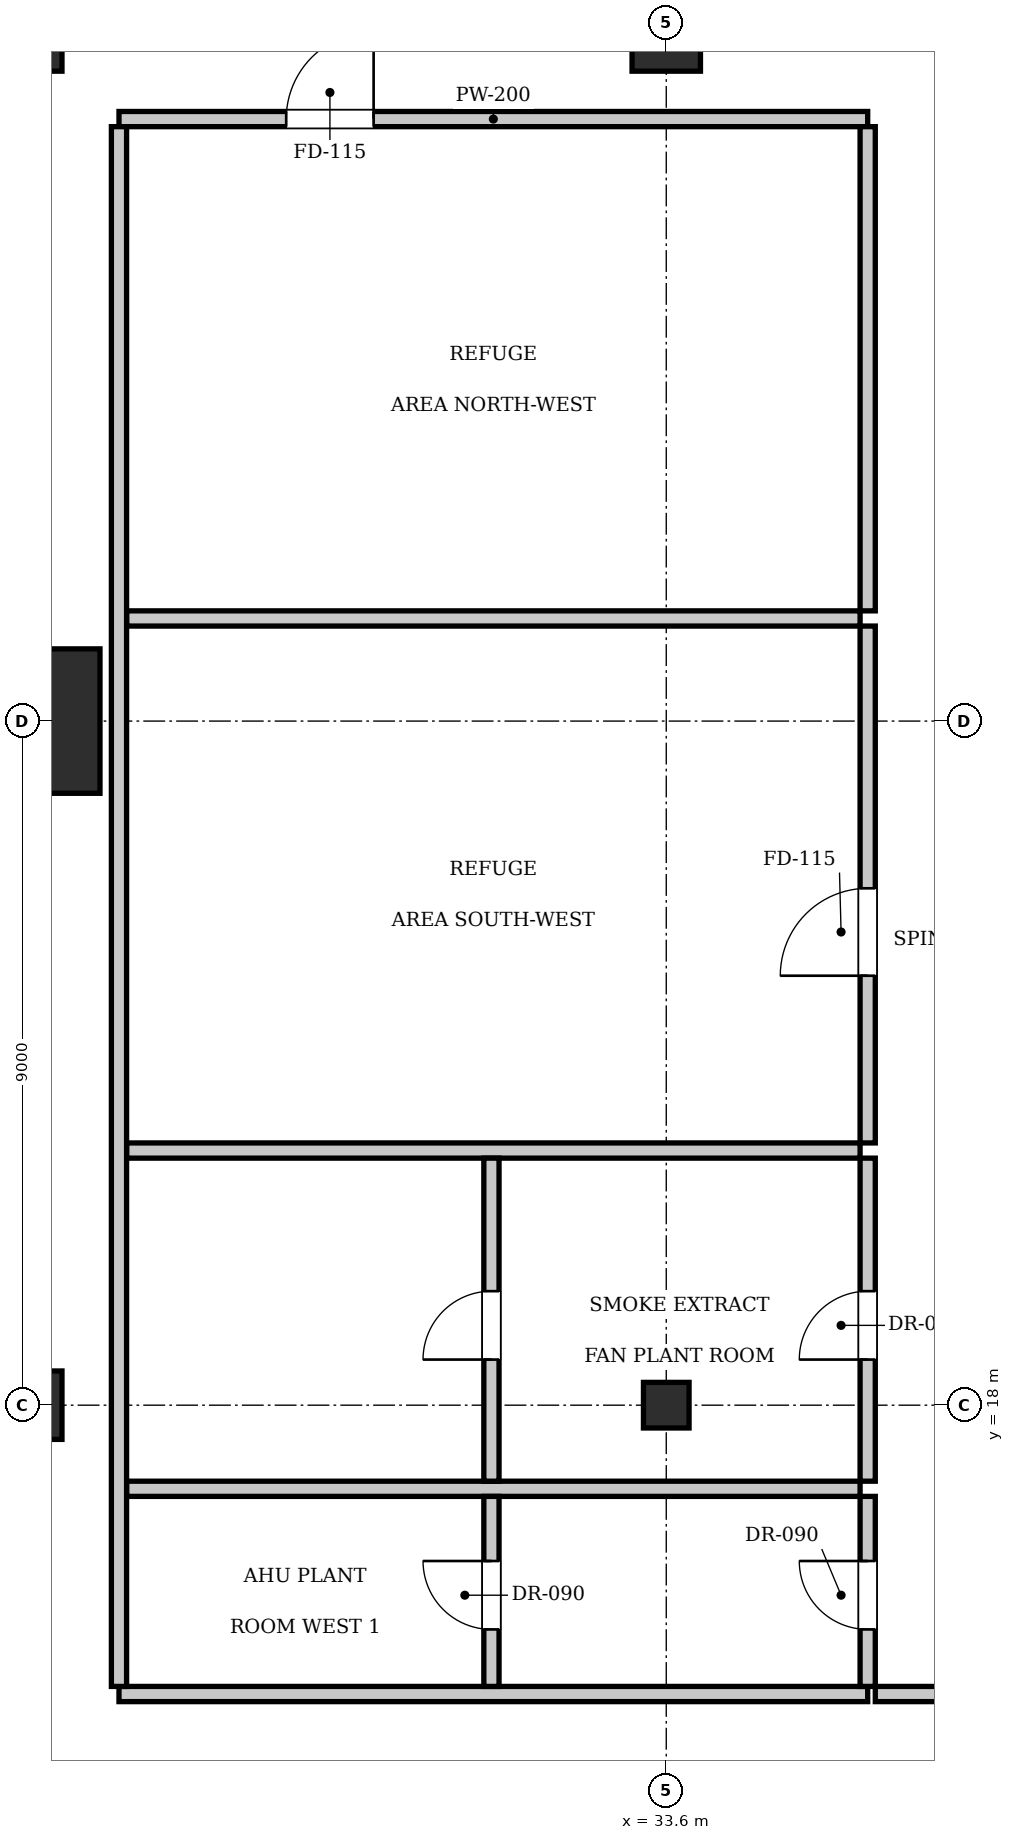
"""IFC4 building model, lengths in metres.
Left out: names, types, materials, properties, quantities, classifications, styles, units other than length and angle.
Written with IfcOpenShell. Run it as: python <this file> out.ifc"""

import sys

from ifc_helpers import new_model, si_unit, direction, frame, frame_2d, origin, origin_2d, place, context, subcontext, project, spatial, rectangle, i_section, extrude, element, fill, save


model = new_model("IFC4")
c1 = context("Model", 3, precision=1e-05, world=origin(), true_north=direction((0.0, 1.0)))
c2 = subcontext(c1, "Body", "Model", "MODEL_VIEW")
j1 = project(units=[si_unit("LENGTHUNIT", "METRE"), si_unit("PLANEANGLEUNIT", "RADIAN")], contexts=[c1])
p1 = place(None, origin())
s1 = spatial("IfcSite", under=j1, at=p1, CompositionType="ELEMENT")
p2 = place(p1, origin())
s2 = spatial("IfcBuilding", under=s1, at=p2, CompositionType="ELEMENT")
p3 = place(p2, frame((0.0, 0.0, 227.5)))
s3 = spatial("IfcBuildingStorey", under=s2, at=p3, CompositionType="ELEMENT", Elevation=227.5)
p4 = place(p3, frame((25.2, 27.0, 0.0), z_axis=(0.0, 0.0, 1.0), x_axis=(1.0, 0.0, 0.0)))
e1 = element("IfcColumn", 1, at=p4, inside=s3, PredefinedType="COLUMN", context=c2, shape_type="SweptSolid", body=[
    extrude(rectangle(XDim=1.9, YDim=1.9, at=origin_2d()), origin(), (0.0, 0.0, 1.0), 7.0),
])
for number, where, z_axis, x_axis in (
    (2, (25.2, 36.0, 0.0), (0.0, 0.0, 1.0), (1.0, 0.0, 0.0)),
    (3, (33.6, 36.0, 0.0), (0.0, 0.0, 1.0), (1.0, 0.0, 0.0)),
    (4, (25.2, 18.0, 0.0), (0.0, 0.0, 1.0), (1.0, 0.0, 0.0)),
):
    element("IfcColumn", number, at=place(p3, frame(where, z_axis=z_axis, x_axis=x_axis)), inside=s3, PredefinedType="COLUMN", context=c2, shape_type="SweptSolid", body=[
        extrude(rectangle(XDim=0.9, YDim=0.9, at=origin_2d()), origin(), (0.0, 0.0, 1.0), 7.0),
    ])
p5 = place(p3, frame((33.6, 18.0, 0.0), z_axis=(0.0, 0.0, 1.0), x_axis=(1.0, 0.0, 0.0)))
e5 = element("IfcColumn", 5, at=p5, inside=s3, PredefinedType="COLUMN", context=c2, shape_type="SweptSolid", body=[
    extrude(i_section(OverallWidth=0.6, OverallDepth=0.6, WebThickness=0.025, FlangeThickness=0.038, at=origin_2d()), origin(), (0.0, 0.0, 1.0), 7.0),
])
p6 = place(p3, frame((26.4, 34.92, 0.0), z_axis=(0.0, 0.0, 1.0), x_axis=(1.0, 0.0, 0.0)))
e6 = element("IfcWall", 6, at=p6, inside=s3, PredefinedType="PARTITIONING", context=c2, shape_type="SweptSolid", body=[
    extrude(rectangle(XDim=9.85, YDim=0.2, at=frame_2d((4.925, 0.0))), origin(), (0.0, 0.0, 1.0), 6.76),
])
p7 = place(p6, frame((2.2, 0.0, 0.0)))
e7 = element("IfcOpeningElement", 7, at=p7, cuts=e6, PredefinedType="OPENING", context=c2, shape_type="SweptSolid", body=[
    extrude(rectangle(XDim=1.15, YDim=2.15, at=frame_2d((0.575, 1.075))), frame((0.0, 0.11, 0.0), z_axis=(0.0, -1.0, 0.0), x_axis=(1.0, 0.0, 0.0)), (0.0, 0.0, 1.0), 0.22),
])
for number, where, z_axis, x_axis in (
    (8, (26.5, 28.35, 0.0), (0.0, 0.0, 1.0), (1.0, 0.0, 0.0)),
    (9, (26.5, 21.35, 0.0), (0.0, 0.0, 1.0), (1.0, 0.0, 0.0)),
    (10, (26.5, 16.9, 0.0), (0.0, 0.0, 1.0), (1.0, 0.0, 0.0)),
):
    element("IfcWall", number, at=place(p3, frame(where, z_axis=z_axis, x_axis=x_axis)), inside=s3, PredefinedType="PARTITIONING", context=c2, shape_type="SweptSolid", body=[
        extrude(rectangle(XDim=9.65, YDim=0.2, at=frame_2d((4.825, 0.0))), origin(), (0.0, 0.0, 1.0), 6.76),
    ])
p8 = place(p3, frame((26.4, 14.2, 0.0), z_axis=(0.0, 0.0, 1.0), x_axis=(1.0, 0.0, 0.0)))
e11 = element("IfcWall", 11, at=p8, inside=s3, PredefinedType="PARTITIONING", context=c2, shape_type="SweptSolid", body=[
    extrude(rectangle(XDim=9.85, YDim=0.2, at=frame_2d((4.925, 0.0))), origin(), (0.0, 0.0, 1.0), 6.76),
])
p9 = place(p3, frame((26.4, 14.3, 0.0), z_axis=(0.0, 0.0, 1.0), x_axis=(0.0, 1.0, 0.0)))
e12 = element("IfcWall", 12, at=p9, inside=s3, PredefinedType="PARTITIONING", context=c2, shape_type="SweptSolid", body=[
    extrude(rectangle(XDim=20.52, YDim=0.2, at=frame_2d((10.26, 0.0))), origin(), (0.0, 0.0, 1.0), 6.76),
])
p10 = place(p3, frame((36.25, 28.45, 0.0), z_axis=(0.0, 0.0, 1.0), x_axis=(0.0, 1.0, 0.0)))
e13 = element("IfcWall", 13, at=p10, inside=s3, PredefinedType="PARTITIONING", context=c2, shape_type="SweptSolid", body=[
    extrude(rectangle(XDim=6.37, YDim=0.2, at=frame_2d((3.185, 0.0))), origin(), (0.0, 0.0, 1.0), 6.76),
])
p11 = place(p3, frame((36.25, 21.45, 0.0), z_axis=(0.0, 0.0, 1.0), x_axis=(0.0, 1.0, 0.0)))
e14 = element("IfcWall", 14, at=p11, inside=s3, PredefinedType="PARTITIONING", context=c2, shape_type="SweptSolid", body=[
    extrude(rectangle(XDim=6.8, YDim=0.2, at=frame_2d((3.4, 0.0))), origin(), (0.0, 0.0, 1.0), 6.76),
])
p12 = place(p11, frame((2.2, 0.0, 0.0)))
e15 = element("IfcOpeningElement", 15, at=p12, cuts=e14, PredefinedType="OPENING", context=c2, shape_type="SweptSolid", body=[
    extrude(rectangle(XDim=1.15, YDim=2.15, at=frame_2d((0.575, 1.075))), frame((0.0, 0.11, 0.0), z_axis=(0.0, -1.0, 0.0), x_axis=(1.0, 0.0, 0.0)), (0.0, 0.0, 1.0), 0.22),
])
p13 = place(p3, frame((36.25, 17.0, 0.0), z_axis=(0.0, 0.0, 1.0), x_axis=(0.0, 1.0, 0.0)))
e16 = element("IfcWall", 16, at=p13, inside=s3, PredefinedType="PARTITIONING", context=c2, shape_type="SweptSolid", body=[
    extrude(rectangle(XDim=4.25, YDim=0.2, at=frame_2d((2.125, 0.0))), origin(), (0.0, 0.0, 1.0), 6.76),
])
p14 = place(p13, frame((1.6, 0.0, 0.0)))
e17 = element("IfcOpeningElement", 17, at=p14, cuts=e16, PredefinedType="OPENING", context=c2, shape_type="SweptSolid", body=[
    extrude(rectangle(XDim=0.9, YDim=2.1, at=frame_2d((0.45, 1.05))), frame((0.0, 0.11, 0.0), z_axis=(0.0, -1.0, 0.0), x_axis=(1.0, 0.0, 0.0)), (0.0, 0.0, 1.0), 0.22),
])
p15 = place(p3, frame((36.25, 14.3, 0.0), z_axis=(0.0, 0.0, 1.0), x_axis=(0.0, 1.0, 0.0)))
e18 = element("IfcWall", 18, at=p15, inside=s3, PredefinedType="PARTITIONING", context=c2, shape_type="SweptSolid", body=[
    extrude(rectangle(XDim=2.5, YDim=0.2, at=frame_2d((1.25, 0.0))), origin(), (0.0, 0.0, 1.0), 6.76),
])
p16 = place(p15, frame((0.75, 0.0, 0.0)))
e19 = element("IfcOpeningElement", 19, at=p16, cuts=e18, PredefinedType="OPENING", context=c2, shape_type="SweptSolid", body=[
    extrude(rectangle(XDim=0.9, YDim=2.1, at=frame_2d((0.45, 1.05))), frame((0.0, 0.11, 0.0), z_axis=(0.0, -1.0, 0.0), x_axis=(1.0, 0.0, 0.0)), (0.0, 0.0, 1.0), 0.22),
])
p17 = place(p3, frame((31.3, 14.3, 0.0), z_axis=(0.0, 0.0, 1.0), x_axis=(0.0, 1.0, 0.0)))
e20 = element("IfcWall", 20, at=p17, inside=s3, PredefinedType="PARTITIONING", context=c2, shape_type="SweptSolid", body=[
    extrude(rectangle(XDim=2.5, YDim=0.2, at=frame_2d((1.25, 0.0))), origin(), (0.0, 0.0, 1.0), 6.76),
])
p18 = place(p17, frame((0.75, 0.0, 0.0)))
e21 = element("IfcOpeningElement", 21, at=p18, cuts=e20, PredefinedType="OPENING", context=c2, shape_type="SweptSolid", body=[
    extrude(rectangle(XDim=0.9, YDim=2.1, at=frame_2d((0.45, 1.05))), frame((0.0, 0.11, 0.0), z_axis=(0.0, -1.0, 0.0), x_axis=(1.0, 0.0, 0.0)), (0.0, 0.0, 1.0), 0.22),
])
p19 = place(p3, frame((31.3, 17.0, 0.0), z_axis=(0.0, 0.0, 1.0), x_axis=(0.0, 1.0, 0.0)))
e22 = element("IfcWall", 22, at=p19, inside=s3, PredefinedType="PARTITIONING", context=c2, shape_type="SweptSolid", body=[
    extrude(rectangle(XDim=4.25, YDim=0.2, at=frame_2d((2.125, 0.0))), origin(), (0.0, 0.0, 1.0), 6.76),
])
p20 = place(p19, frame((1.6, 0.0, 0.0)))
e23 = element("IfcOpeningElement", 23, at=p20, cuts=e22, PredefinedType="OPENING", context=c2, shape_type="SweptSolid", body=[
    extrude(rectangle(XDim=0.9, YDim=2.1, at=frame_2d((0.45, 1.05))), frame((0.0, 0.11, 0.0), z_axis=(0.0, -1.0, 0.0), x_axis=(1.0, 0.0, 0.0)), (0.0, 0.0, 1.0), 0.22),
])
p21 = place(p3, frame((36.35, 14.2, 0.0), z_axis=(0.0, 0.0, 1.0), x_axis=(1.0, 0.0, 0.0)))
e24 = element("IfcWall", 24, at=p21, inside=s3, PredefinedType="PARTITIONING", context=c2, shape_type="SweptSolid", body=[
    extrude(rectangle(XDim=2.9, YDim=0.2, at=frame_2d((1.45, 0.0))), origin(), (0.0, 0.0, 1.0), 6.76),
])
p22 = place(p21, frame((0.875, 0.0, 0.0)))
e25 = element("IfcOpeningElement", 25, at=p22, cuts=e24, PredefinedType="OPENING", context=c2, shape_type="SweptSolid", body=[
    extrude(rectangle(XDim=1.15, YDim=2.15, at=frame_2d((0.575, 1.075))), frame((0.0, 0.11, 0.0), z_axis=(0.0, -1.0, 0.0), x_axis=(1.0, 0.0, 0.0)), (0.0, 0.0, 1.0), 0.22),
])
p23 = place(p7, origin())
e26 = element("IfcDoor", 26, at=p23, inside=s3, OperationType="SINGLE_SWING_RIGHT", PredefinedType="DOOR", context=c2, shape_type="SweptSolid", body=[
    extrude(rectangle(XDim=1.15, YDim=2.15, at=frame_2d((0.575, 1.075))), frame((0.0, 0.025, 0.0), z_axis=(0.0, -1.0, 0.0), x_axis=(1.0, 0.0, 0.0)), (0.0, 0.0, 1.0), 0.05),
])
fill(e7, e26)
p24 = place(p12, origin())
e27 = element("IfcDoor", 27, at=p24, inside=s3, OperationType="SINGLE_SWING_LEFT", PredefinedType="DOOR", context=c2, shape_type="SweptSolid", body=[
    extrude(rectangle(XDim=1.15, YDim=2.15, at=frame_2d((0.575, 1.075))), frame((0.0, 0.025, 0.0), z_axis=(0.0, -1.0, 0.0), x_axis=(1.0, 0.0, 0.0)), (0.0, 0.0, 1.0), 0.05),
])
fill(e15, e27)
p25 = place(p16, origin())
e28 = element("IfcDoor", 28, at=p25, inside=s3, OperationType="SINGLE_SWING_RIGHT", PredefinedType="DOOR", context=c2, shape_type="SweptSolid", body=[
    extrude(rectangle(XDim=0.9, YDim=2.1, at=frame_2d((0.45, 1.05))), frame((0.0, 0.025, 0.0), z_axis=(0.0, -1.0, 0.0), x_axis=(1.0, 0.0, 0.0)), (0.0, 0.0, 1.0), 0.05),
])
fill(e19, e28)
p26 = place(p14, origin())
e29 = element("IfcDoor", 29, at=p26, inside=s3, OperationType="SINGLE_SWING_LEFT", PredefinedType="DOOR", context=c2, shape_type="SweptSolid", body=[
    extrude(rectangle(XDim=0.9, YDim=2.1, at=frame_2d((0.45, 1.05))), frame((0.0, 0.025, 0.0), z_axis=(0.0, -1.0, 0.0), x_axis=(1.0, 0.0, 0.0)), (0.0, 0.0, 1.0), 0.05),
])
fill(e17, e29)
p27 = place(p18, origin())
e30 = element("IfcDoor", 30, at=p27, inside=s3, OperationType="SINGLE_SWING_RIGHT", PredefinedType="DOOR", context=c2, shape_type="SweptSolid", body=[
    extrude(rectangle(XDim=0.9, YDim=2.1, at=frame_2d((0.45, 1.05))), frame((0.0, 0.025, 0.0), z_axis=(0.0, -1.0, 0.0), x_axis=(1.0, 0.0, 0.0)), (0.0, 0.0, 1.0), 0.05),
])
fill(e21, e30)
p28 = place(p20, origin())
e31 = element("IfcDoor", 31, at=p28, inside=s3, OperationType="SINGLE_SWING_LEFT", PredefinedType="DOOR", context=c2, shape_type="SweptSolid", body=[
    extrude(rectangle(XDim=0.9, YDim=2.1, at=frame_2d((0.45, 1.05))), frame((0.0, 0.025, 0.0), z_axis=(0.0, -1.0, 0.0), x_axis=(1.0, 0.0, 0.0)), (0.0, 0.0, 1.0), 0.05),
])
fill(e23, e31)
save(model, sys.argv[1])
